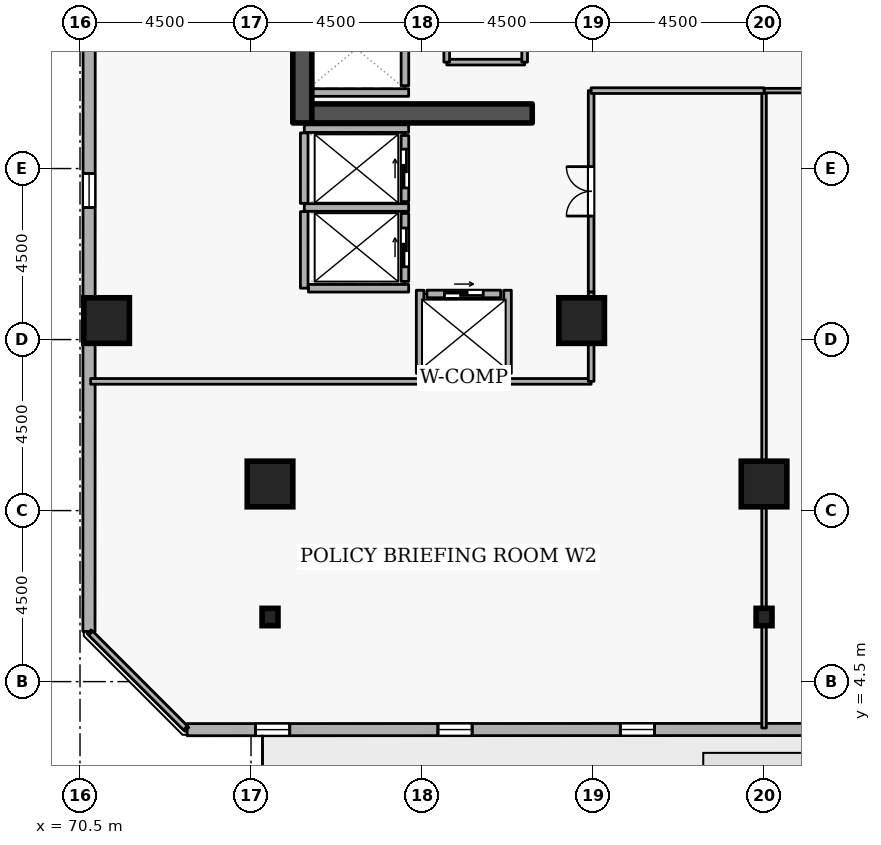
"""IFC4 building model, lengths in metres.
Left out: names, types, materials, properties, quantities, classifications, styles, units other than length and angle.
Written with IfcOpenShell. Run it as: python <this file> out.ifc"""

import sys

from ifc_helpers import new_model, si_unit, direction, frame, frame_2d, origin, origin_2d, place, context, subcontext, project, spatial, rectangle, i_section, extrude, element, fill, save


model = new_model("IFC4")
c1 = context("Model", 3, precision=1e-05, world=origin(), true_north=direction((0.0, 1.0)))
c2 = subcontext(c1, "Body", "Model", "MODEL_VIEW")
j1 = project(units=[si_unit("LENGTHUNIT", "METRE"), si_unit("PLANEANGLEUNIT", "RADIAN")], contexts=[c1])
p1 = place(None, origin())
s1 = spatial("IfcSite", under=j1, at=p1, CompositionType="ELEMENT")
p2 = place(p1, origin())
s2 = spatial("IfcBuilding", under=s1, at=p2, CompositionType="ELEMENT")
p3 = place(p2, frame((0.0, 0.0, 123.3)))
s3 = spatial("IfcBuildingStorey", under=s2, at=p3, CompositionType="ELEMENT", Elevation=123.3)
p4 = place(p3, frame((76.35, 19.2, 0.0), z_axis=(0.0, 0.0, 1.0), x_axis=(0.0, 1.0, 0.0)))
e1 = element("IfcWall", 1, at=p4, inside=s3, PredefinedType="SHEAR", context=c2, shape_type="SweptSolid", body=[
    extrude(rectangle(XDim=15.6, YDim=0.5, at=frame_2d((7.8, 0.0))), origin(), (0.0, 0.0, 1.0), 3.6),
])
p5 = place(p3, frame((76.6, 19.45, 0.0), z_axis=(0.0, 0.0, 1.0), x_axis=(1.0, 0.0, 0.0)))
e2 = element("IfcWall", 2, at=p5, inside=s3, PredefinedType="SHEAR", context=c2, shape_type="SweptSolid", body=[
    extrude(rectangle(XDim=5.8, YDim=0.5, at=frame_2d((2.9, 0.0))), origin(), (0.0, 0.0, 1.0), 3.6),
])
for number, where, z_axis, x_axis in (
    (3, (71.2, 14.0, 0.0), (0.0, 0.0, 1.0), (1.0, 0.0, 0.0)),
    (4, (88.5, 9.7, 0.0), (0.0, 0.0, 1.0), (1.0, 0.0, 0.0)),
    (5, (75.5, 9.7, 0.0), (0.0, 0.0, 1.0), (1.0, 0.0, 0.0)),
    (6, (83.7, 14.0, 0.0), (0.0, 0.0, 1.0), (1.0, 0.0, 0.0)),
):
    element("IfcColumn", number, at=place(p3, frame(where, z_axis=z_axis, x_axis=x_axis)), inside=s3, PredefinedType="COLUMN", context=c2, shape_type="SweptSolid", body=[
        extrude(rectangle(XDim=1.2, YDim=1.2, at=origin_2d()), origin(), (0.0, 0.0, 1.0), 3.6),
    ])
for number, where, z_axis, x_axis in (
    (7, (88.5, 6.2, 0.0), (0.0, 0.0, 1.0), (1.0, 0.0, 0.0)),
    (8, (75.5, 6.2, 0.0), (0.0, 0.0, 1.0), (1.0, 0.0, 0.0)),
):
    element("IfcColumn", number, at=place(p3, frame(where, z_axis=z_axis, x_axis=x_axis)), inside=s3, PredefinedType="COLUMN", context=c2, shape_type="SweptSolid", body=[
        extrude(i_section(OverallWidth=0.418, OverallDepth=0.456, WebThickness=0.042, FlangeThickness=0.067, FilletRadius=0.015, at=origin_2d()), origin(), (0.0, 0.0, 1.0), 3.6),
    ])
p6 = place(p3, frame((73.319, 3.235, 0.0), z_axis=(0.0, 0.0, 1.0), x_axis=(0.999999944762, 0.000332378036, 0.0)))
e9 = element("IfcWall", 9, at=p6, inside=s3, PredefinedType="STANDARD", context=c2, shape_type="SweptSolid", body=[
    extrude(rectangle(XDim=33.054, YDim=0.32, at=frame_2d((16.527, 0.0))), origin(), (0.0, 0.0, 1.0), 2.7),
])
p7 = place(p6, frame((18.327, 0.0, 0.0)))
e10 = element("IfcOpeningElement", 10, at=p7, cuts=e9, PredefinedType="OPENING", context=c2, shape_type="SweptSolid", body=[
    extrude(rectangle(XDim=1.0, YDim=2.08, at=frame_2d((0.5, 1.04))), frame((0.0, 0.17, 0.0), z_axis=(0.0, -1.0, 0.0), x_axis=(1.0, 0.0, 0.0)), (0.0, 0.0, 1.0), 0.34),
])
p8 = place(p6, frame((1.8, 0.0, 0.72)))
e11 = element("IfcOpeningElement", 11, at=p8, cuts=e9, PredefinedType="OPENING", context=c2, shape_type="SweptSolid", body=[
    extrude(rectangle(XDim=0.9, YDim=1.75, at=frame_2d((0.45, 0.875))), frame((0.0, 0.17, 0.0), z_axis=(0.0, -1.0, 0.0), x_axis=(1.0, 0.0, 0.0)), (0.0, 0.0, 1.0), 0.34),
])
p9 = place(p6, frame((6.6, 0.0, 0.72)))
e12 = element("IfcOpeningElement", 12, at=p9, cuts=e9, PredefinedType="OPENING", context=c2, shape_type="SweptSolid", body=[
    extrude(rectangle(XDim=0.9, YDim=1.75, at=frame_2d((0.45, 0.875))), frame((0.0, 0.17, 0.0), z_axis=(0.0, -1.0, 0.0), x_axis=(1.0, 0.0, 0.0)), (0.0, 0.0, 1.0), 0.34),
])
p10 = place(p6, frame((11.4, 0.0, 0.72)))
e13 = element("IfcOpeningElement", 13, at=p10, cuts=e9, PredefinedType="OPENING", context=c2, shape_type="SweptSolid", body=[
    extrude(rectangle(XDim=0.9, YDim=1.75, at=frame_2d((0.45, 0.875))), frame((0.0, 0.17, 0.0), z_axis=(0.0, -1.0, 0.0), x_axis=(1.0, 0.0, 0.0)), (0.0, 0.0, 1.0), 0.34),
])
p11 = place(p6, frame((16.2, 0.0, 0.72)))
e14 = element("IfcOpeningElement", 14, at=p11, cuts=e9, PredefinedType="OPENING", context=c2, shape_type="SweptSolid", body=[
    extrude(rectangle(XDim=0.9, YDim=1.75, at=frame_2d((0.45, 0.875))), frame((0.0, 0.17, 0.0), z_axis=(0.0, -1.0, 0.0), x_axis=(1.0, 0.0, 0.0)), (0.0, 0.0, 1.0), 0.34),
])
p12 = place(p6, frame((21.0, 0.0, 0.72)))
e15 = element("IfcOpeningElement", 15, at=p12, cuts=e9, PredefinedType="OPENING", context=c2, shape_type="SweptSolid", body=[
    extrude(rectangle(XDim=0.9, YDim=1.75, at=frame_2d((0.45, 0.875))), frame((0.0, 0.17, 0.0), z_axis=(0.0, -1.0, 0.0), x_axis=(1.0, 0.0, 0.0)), (0.0, 0.0, 1.0), 0.34),
])
p13 = place(p6, frame((25.8, 0.0, 0.72)))
e16 = element("IfcOpeningElement", 16, at=p13, cuts=e9, PredefinedType="OPENING", context=c2, shape_type="SweptSolid", body=[
    extrude(rectangle(XDim=0.9, YDim=1.75, at=frame_2d((0.45, 0.875))), frame((0.0, 0.17, 0.0), z_axis=(0.0, -1.0, 0.0), x_axis=(1.0, 0.0, 0.0)), (0.0, 0.0, 1.0), 0.34),
])
p14 = place(p3, frame((70.746, 38.872, 0.0), z_axis=(0.0, 0.0, 1.0), x_axis=(-0.000332378036, -0.999999944762, 0.0)))
e17 = element("IfcWall", 17, at=p14, inside=s3, PredefinedType="STANDARD", context=c2, shape_type="SweptSolid", body=[
    extrude(rectangle(XDim=33.054, YDim=0.32, at=frame_2d((16.527, 0.0))), origin(), (0.0, 0.0, 1.0), 2.7),
])
p15 = place(p14, frame((1.8, 0.0, 0.72)))
e18 = element("IfcOpeningElement", 18, at=p15, cuts=e17, PredefinedType="OPENING", context=c2, shape_type="SweptSolid", body=[
    extrude(rectangle(XDim=0.9, YDim=1.75, at=frame_2d((0.45, 0.875))), frame((0.0, 0.17, 0.0), z_axis=(0.0, -1.0, 0.0), x_axis=(1.0, 0.0, 0.0)), (0.0, 0.0, 1.0), 0.34),
])
p16 = place(p14, frame((6.6, 0.0, 0.72)))
e19 = element("IfcOpeningElement", 19, at=p16, cuts=e17, PredefinedType="OPENING", context=c2, shape_type="SweptSolid", body=[
    extrude(rectangle(XDim=0.9, YDim=1.75, at=frame_2d((0.45, 0.875))), frame((0.0, 0.17, 0.0), z_axis=(0.0, -1.0, 0.0), x_axis=(1.0, 0.0, 0.0)), (0.0, 0.0, 1.0), 0.34),
])
p17 = place(p14, frame((16.2, 0.0, 0.72)))
e20 = element("IfcOpeningElement", 20, at=p17, cuts=e17, PredefinedType="OPENING", context=c2, shape_type="SweptSolid", body=[
    extrude(rectangle(XDim=0.9, YDim=1.75, at=frame_2d((0.45, 0.875))), frame((0.0, 0.17, 0.0), z_axis=(0.0, -1.0, 0.0), x_axis=(1.0, 0.0, 0.0)), (0.0, 0.0, 1.0), 0.34),
])
p18 = place(p14, frame((21.0, 0.0, 0.72)))
e21 = element("IfcOpeningElement", 21, at=p18, cuts=e17, PredefinedType="OPENING", context=c2, shape_type="SweptSolid", body=[
    extrude(rectangle(XDim=0.9, YDim=1.75, at=frame_2d((0.45, 0.875))), frame((0.0, 0.17, 0.0), z_axis=(0.0, -1.0, 0.0), x_axis=(1.0, 0.0, 0.0)), (0.0, 0.0, 1.0), 0.34),
])
p19 = place(p3, frame((79.05, 20.18, 0.0), z_axis=(0.0, 0.0, 1.0), x_axis=(0.0, 1.0, 0.0)))
e22 = element("IfcWall", 22, at=p19, inside=s3, PredefinedType="STANDARD", context=c2, shape_type="SweptSolid", body=[
    extrude(rectangle(XDim=1.94, YDim=0.2, at=frame_2d((0.97, 0.0))), origin(), (0.0, 0.0, 1.0), 3.34),
])
p20 = place(p3, frame((79.05, 17.13, 0.0), z_axis=(0.0, 0.0, 1.0), x_axis=(0.0, 1.0, 0.0)))
e23 = element("IfcWall", 23, at=p20, inside=s3, PredefinedType="STANDARD", context=c2, shape_type="SweptSolid", body=[
    extrude(rectangle(XDim=1.74, YDim=0.2, at=frame_2d((0.87, 0.0))), origin(), (0.0, 0.0, 1.0), 3.34),
])
p21 = place(p20, frame((0.36, 0.0, 0.0)))
e24 = element("IfcOpeningElement", 24, at=p21, cuts=e23, PredefinedType="OPENING", context=c2, shape_type="SweptSolid", body=[
    extrude(rectangle(XDim=1.02, YDim=2.06, at=frame_2d((0.51, 1.03))), frame((0.0, 0.11, 0.0), z_axis=(0.0, -1.0, 0.0), x_axis=(1.0, 0.0, 0.0)), (0.0, 0.0, 1.0), 0.22),
])
p22 = place(p3, frame((79.05, 15.03, 0.0), z_axis=(0.0, 0.0, 1.0), x_axis=(0.0, 1.0, 0.0)))
e25 = element("IfcWall", 25, at=p22, inside=s3, PredefinedType="STANDARD", context=c2, shape_type="SweptSolid", body=[
    extrude(rectangle(XDim=1.79, YDim=0.2, at=frame_2d((0.895, 0.0))), origin(), (0.0, 0.0, 1.0), 3.34),
])
p23 = place(p22, frame((0.385, 0.0, 0.0)))
e26 = element("IfcOpeningElement", 26, at=p23, cuts=e25, PredefinedType="OPENING", context=c2, shape_type="SweptSolid", body=[
    extrude(rectangle(XDim=1.02, YDim=2.06, at=frame_2d((0.51, 1.03))), frame((0.0, 0.11, 0.0), z_axis=(0.0, -1.0, 0.0), x_axis=(1.0, 0.0, 0.0)), (0.0, 0.0, 1.0), 0.22),
])
p24 = place(p3, frame((79.63, 14.7, 0.0), z_axis=(0.0, 0.0, 1.0), x_axis=(1.0, 0.0, 0.0)))
e27 = element("IfcWall", 27, at=p24, inside=s3, PredefinedType="STANDARD", context=c2, shape_type="SweptSolid", body=[
    extrude(rectangle(XDim=1.94, YDim=0.2, at=frame_2d((0.97, 0.0))), origin(), (0.0, 0.0, 1.0), 3.34),
])
p25 = place(p24, frame((0.46, 0.0, 0.0)))
e28 = element("IfcOpeningElement", 28, at=p25, cuts=e27, PredefinedType="OPENING", context=c2, shape_type="SweptSolid", body=[
    extrude(rectangle(XDim=1.02, YDim=2.06, at=frame_2d((0.51, 1.03))), frame((0.0, 0.11, 0.0), z_axis=(0.0, -1.0, 0.0), x_axis=(1.0, 0.0, 0.0)), (0.0, 0.0, 1.0), 0.22),
])
p26 = place(p3, frame((76.612, 20.0, 0.0), z_axis=(0.0, 0.0, 1.0), x_axis=(1.0, 0.0, 0.0)))
e29 = element("IfcWall", 29, at=p26, inside=s3, PredefinedType="STANDARD", context=c2, shape_type="SweptSolid", body=[
    extrude(rectangle(XDim=2.536, YDim=0.2, at=frame_2d((1.268, 0.0))), origin(), (0.0, 0.0, 1.0), 3.34),
])
p27 = place(p3, frame((76.402, 19.05, 0.0), z_axis=(0.0, 0.0, 1.0), x_axis=(1.0, 0.0, 0.0)))
e30 = element("IfcWall", 30, at=p27, inside=s3, PredefinedType="STANDARD", context=c2, shape_type="SweptSolid", body=[
    extrude(rectangle(XDim=2.746, YDim=0.2, at=frame_2d((1.373, 0.0))), origin(), (0.0, 0.0, 1.0), 2.545),
])
p28 = place(p3, frame((76.402, 16.975, 0.0), z_axis=(0.0, 0.0, 1.0), x_axis=(1.0, 0.0, 0.0)))
e31 = element("IfcWall", 31, at=p28, inside=s3, PredefinedType="STANDARD", context=c2, shape_type="SweptSolid", body=[
    extrude(rectangle(XDim=2.746, YDim=0.2, at=frame_2d((1.373, 0.0))), origin(), (0.0, 0.0, 1.0), 3.34),
])
p29 = place(p3, frame((76.4, 14.852, 0.0), z_axis=(0.0, 0.0, 1.0), x_axis=(0.0, 1.0, 0.0)))
e32 = element("IfcWall", 32, at=p29, inside=s3, PredefinedType="STANDARD", context=c2, shape_type="SweptSolid", body=[
    extrude(rectangle(XDim=2.016, YDim=0.2, at=frame_2d((1.008, 0.0))), origin(), (0.0, 0.0, 1.0), 3.34),
])
p30 = place(p3, frame((76.4, 17.082, 0.0), z_axis=(0.0, 0.0, 1.0), x_axis=(0.0, 1.0, 0.0)))
e33 = element("IfcWall", 33, at=p30, inside=s3, PredefinedType="STANDARD", context=c2, shape_type="SweptSolid", body=[
    extrude(rectangle(XDim=1.856, YDim=0.2, at=frame_2d((0.928, 0.0))), origin(), (0.0, 0.0, 1.0), 3.34),
])
p31 = place(p3, frame((76.512, 14.85, 0.0), z_axis=(0.0, 0.0, 1.0), x_axis=(1.0, 0.0, 0.0)))
e34 = element("IfcWall", 34, at=p31, inside=s3, PredefinedType="STANDARD", context=c2, shape_type="SweptSolid", body=[
    extrude(rectangle(XDim=2.636, YDim=0.2, at=frame_2d((1.318, 0.0))), origin(), (0.0, 0.0, 1.0), 3.34),
])
p32 = place(p3, frame((79.452, 12.5, 0.0), z_axis=(0.0, 0.0, 1.0), x_axis=(1.0, 0.0, 0.0)))
e35 = element("IfcWall", 35, at=p32, inside=s3, PredefinedType="STANDARD", context=c2, shape_type="SweptSolid", body=[
    extrude(rectangle(XDim=2.296, YDim=0.2, at=frame_2d((1.148, 0.0))), origin(), (0.0, 0.0, 1.0), 3.34),
])
for number, where, z_axis, x_axis in (
    (36, (81.75, 12.612, 0.0), (0.0, 0.0, 1.0), (0.0, 1.0, 0.0)),
    (37, (79.45, 12.612, 0.0), (0.0, 0.0, 1.0), (0.0, 1.0, 0.0)),
):
    element("IfcWall", number, at=place(p3, frame(where, z_axis=z_axis, x_axis=x_axis)), inside=s3, PredefinedType="STANDARD", context=c2, shape_type="SweptSolid", body=[
        extrude(rectangle(XDim=2.186, YDim=0.2, at=frame_2d((1.093, 0.0))), origin(), (0.0, 0.0, 1.0), 3.34),
    ])
p33 = place(p3, frame((82.2, 20.8, 0.0), z_axis=(0.0, 0.0, 1.0), x_axis=(-1.0, 0.0, 0.0)))
e38 = element("IfcWall", 38, at=p33, inside=s3, PredefinedType="PARTITIONING", context=c2, shape_type="SweptSolid", body=[
    extrude(rectangle(XDim=2.05, YDim=0.15, at=frame_2d((1.025, 0.0))), origin(), (0.0, 0.0, 1.0), 3.34),
])
p34 = place(p3, frame((80.15, 20.8, 0.0), z_axis=(0.0, 0.0, 1.0), x_axis=(0.0, 1.0, 0.0)))
e39 = element("IfcWall", 39, at=p34, inside=s3, PredefinedType="PARTITIONING", context=c2, shape_type="SweptSolid", body=[
    extrude(rectangle(XDim=3.25, YDim=0.15, at=frame_2d((1.625, 0.0))), origin(), (0.0, 0.0, 1.0), 3.34),
])
p35 = place(p3, frame((82.2, 24.05, 0.0), z_axis=(0.0, 0.0, 1.0), x_axis=(0.0, -1.0, 0.0)))
e40 = element("IfcWall", 40, at=p35, inside=s3, PredefinedType="PARTITIONING", context=c2, shape_type="SweptSolid", body=[
    extrude(rectangle(XDim=3.25, YDim=0.15, at=frame_2d((1.625, 0.0))), origin(), (0.0, 0.0, 1.0), 3.34),
])
p36 = place(p35, frame((1.165, 0.0, 0.0)))
e41 = element("IfcOpeningElement", 41, at=p36, cuts=e40, PredefinedType="OPENING", context=c2, shape_type="SweptSolid", body=[
    extrude(rectangle(XDim=0.92, YDim=2.08, at=frame_2d((0.46, 1.04))), frame((0.0, 0.085, 0.0), z_axis=(0.0, -1.0, 0.0), x_axis=(1.0, 0.0, 0.0)), (0.0, 0.0, 1.0), 0.17),
])
p37 = place(p3, frame((88.5, 3.28, 0.0), z_axis=(0.0, 0.0, 1.0), x_axis=(0.0, 1.0, 0.0)))
e42 = element("IfcWall", 42, at=p37, inside=s3, PredefinedType="PARTITIONING", context=c2, shape_type="SweptSolid", body=[
    extrude(rectangle(XDim=16.77, YDim=0.12, at=frame_2d((8.385, 0.0))), origin(), (0.0, 0.0, 1.0), 2.932),
])
p38 = place(p3, frame((88.5, 20.05, 0.0), z_axis=(0.0, 0.0, 1.0), x_axis=(1.0, 0.0, 0.0)))
e43 = element("IfcWall", 43, at=p38, inside=s3, PredefinedType="PARTITIONING", context=c2, shape_type="SweptSolid", body=[
    extrude(rectangle(XDim=4.55, YDim=0.12, at=frame_2d((2.275, 0.0))), origin(), (0.0, 0.0, 1.0), 3.34),
])
p39 = place(p3, frame((83.95, 14.75, 0.0), z_axis=(0.0, 0.0, 1.0), x_axis=(0.0, 1.0, 0.0)))
e44 = element("IfcWall", 44, at=p39, inside=s3, PredefinedType="PARTITIONING", context=c2, shape_type="SweptSolid", body=[
    extrude(rectangle(XDim=5.3, YDim=0.15, at=frame_2d((2.65, 0.0))), origin(), (0.0, 0.0, 1.0), 3.34),
])
p40 = place(p39, frame((2.0, 0.0, 0.0)))
e45 = element("IfcOpeningElement", 45, at=p40, cuts=e44, PredefinedType="OPENING", context=c2, shape_type="SweptSolid", body=[
    extrude(rectangle(XDim=1.3, YDim=2.12, at=frame_2d((0.65, 1.06))), frame((0.0, 0.085, 0.0), z_axis=(0.0, -1.0, 0.0), x_axis=(1.0, 0.0, 0.0)), (0.0, 0.0, 1.0), 0.17),
])
p41 = place(p3, frame((83.95, 20.05, 0.0), z_axis=(0.0, 0.0, 1.0), x_axis=(1.0, 0.0, 0.0)))
e46 = element("IfcWall", 46, at=p41, inside=s3, PredefinedType="PARTITIONING", context=c2, shape_type="SweptSolid", body=[
    extrude(rectangle(XDim=4.55, YDim=0.15, at=frame_2d((2.275, 0.0))), origin(), (0.0, 0.0, 1.0), 3.34),
])
p42 = place(p3, frame((73.275, 3.28, 0.0), z_axis=(0.0, 0.0, 1.0), x_axis=(-0.707106781187, 0.707106781187, 0.0)))
e47 = element("IfcWall", 47, at=p42, inside=s3, PredefinedType="PARTITIONING", context=c2, shape_type="SweptSolid", body=[
    extrude(rectangle(XDim=3.528, YDim=0.15, at=frame_2d((1.764, 0.0))), origin(), (0.0, 0.0, 1.0), 3.34),
])
p43 = place(p3, frame((70.78, 12.4, 0.0), z_axis=(0.0, 0.0, 1.0), x_axis=(1.0, 0.0, 0.0)))
e48 = element("IfcWall", 48, at=p43, inside=s3, PredefinedType="PARTITIONING", context=c2, shape_type="SweptSolid", body=[
    extrude(rectangle(XDim=8.672, YDim=0.15, at=frame_2d((4.336, 0.0))), origin(), (0.0, 0.0, 1.0), 3.34),
])
p44 = place(p3, frame((81.748, 12.4, 0.0), z_axis=(0.0, 0.0, 1.0), x_axis=(1.0, 0.0, 0.0)))
e49 = element("IfcWall", 49, at=p44, inside=s3, PredefinedType="PARTITIONING", context=c2, shape_type="SweptSolid", body=[
    extrude(rectangle(XDim=2.202, YDim=0.15, at=frame_2d((1.101, 0.0))), origin(), (0.0, 0.0, 1.0), 3.34),
])
p45 = place(p3, frame((83.95, 12.4, 0.0), z_axis=(0.0, 0.0, 1.0), x_axis=(0.0, 1.0, 0.0)))
e50 = element("IfcWall", 50, at=p45, inside=s3, PredefinedType="PARTITIONING", context=c2, shape_type="SweptSolid", body=[
    extrude(rectangle(XDim=2.35, YDim=0.15, at=frame_2d((1.175, 0.0))), origin(), (0.0, 0.0, 1.0), 3.34),
])
p46 = place(p8, origin())
e51 = element("IfcWindow", 51, at=p46, inside=s3, PartitioningType="SINGLE_PANEL", PredefinedType="WINDOW", context=c2, shape_type="SweptSolid", body=[
    extrude(rectangle(XDim=0.9, YDim=1.75, at=frame_2d((0.45, 0.875))), frame((0.0, 0.03, 0.0), z_axis=(0.0, -1.0, 0.0), x_axis=(1.0, 0.0, 0.0)), (0.0, 0.0, 1.0), 0.06),
])
fill(e11, e51)
p47 = place(p9, origin())
e52 = element("IfcWindow", 52, at=p47, inside=s3, PartitioningType="SINGLE_PANEL", PredefinedType="WINDOW", context=c2, shape_type="SweptSolid", body=[
    extrude(rectangle(XDim=0.9, YDim=1.75, at=frame_2d((0.45, 0.875))), frame((0.0, 0.03, 0.0), z_axis=(0.0, -1.0, 0.0), x_axis=(1.0, 0.0, 0.0)), (0.0, 0.0, 1.0), 0.06),
])
fill(e12, e52)
p48 = place(p10, origin())
e53 = element("IfcWindow", 53, at=p48, inside=s3, PartitioningType="SINGLE_PANEL", PredefinedType="WINDOW", context=c2, shape_type="SweptSolid", body=[
    extrude(rectangle(XDim=0.9, YDim=1.75, at=frame_2d((0.45, 0.875))), frame((0.0, 0.03, 0.0), z_axis=(0.0, -1.0, 0.0), x_axis=(1.0, 0.0, 0.0)), (0.0, 0.0, 1.0), 0.06),
])
fill(e13, e53)
p49 = place(p18, origin())
e54 = element("IfcWindow", 54, at=p49, inside=s3, PartitioningType="SINGLE_PANEL", PredefinedType="WINDOW", context=c2, shape_type="SweptSolid", body=[
    extrude(rectangle(XDim=0.9, YDim=1.75, at=frame_2d((0.45, 0.875))), frame((0.0, 0.03, 0.0), z_axis=(0.0, -1.0, 0.0), x_axis=(1.0, 0.0, 0.0)), (0.0, 0.0, 1.0), 0.06),
])
fill(e21, e54)
p50 = place(p21, origin())
e55 = element("IfcDoor", 55, at=p50, inside=s3, OperationType="SLIDING_TO_LEFT", PredefinedType="DOOR", context=c2, shape_type="SweptSolid", body=[
    extrude(rectangle(XDim=1.02, YDim=2.06, at=frame_2d((0.51, 1.03))), frame((0.0, 0.025, 0.0), z_axis=(0.0, -1.0, 0.0), x_axis=(1.0, 0.0, 0.0)), (0.0, 0.0, 1.0), 0.05),
])
fill(e24, e55)
p51 = place(p23, origin())
e56 = element("IfcDoor", 56, at=p51, inside=s3, OperationType="SLIDING_TO_LEFT", PredefinedType="DOOR", context=c2, shape_type="SweptSolid", body=[
    extrude(rectangle(XDim=1.02, YDim=2.06, at=frame_2d((0.51, 1.03))), frame((0.0, 0.025, 0.0), z_axis=(0.0, -1.0, 0.0), x_axis=(1.0, 0.0, 0.0)), (0.0, 0.0, 1.0), 0.05),
])
fill(e26, e56)
p52 = place(p25, origin())
e57 = element("IfcDoor", 57, at=p52, inside=s3, OperationType="SLIDING_TO_LEFT", PredefinedType="DOOR", context=c2, shape_type="SweptSolid", body=[
    extrude(rectangle(XDim=1.02, YDim=2.06, at=frame_2d((0.51, 1.03))), frame((0.0, 0.025, 0.0), z_axis=(0.0, -1.0, 0.0), x_axis=(1.0, 0.0, 0.0)), (0.0, 0.0, 1.0), 0.05),
])
fill(e28, e57)
p53 = place(p40, origin())
e58 = element("IfcDoor", 58, at=p53, inside=s3, OperationType="DOUBLE_DOOR_SINGLE_SWING", PredefinedType="DOOR", context=c2, shape_type="SweptSolid", body=[
    extrude(rectangle(XDim=1.3, YDim=2.12, at=frame_2d((0.65, 1.06))), frame((0.0, 0.025, 0.0), z_axis=(0.0, -1.0, 0.0), x_axis=(1.0, 0.0, 0.0)), (0.0, 0.0, 1.0), 0.05),
])
fill(e45, e58)
save(model, sys.argv[1])
